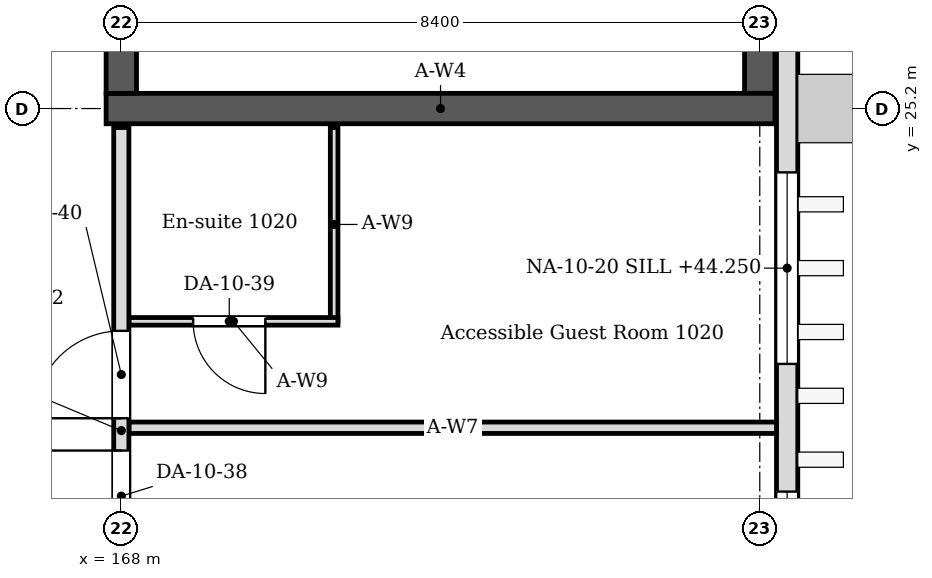
"""IFC4 building model, lengths in metres.
Left out: names, types, materials, properties, quantities, classifications, styles, units other than length and angle.
Written with IfcOpenShell. Run it as: python <this file> out.ifc"""

import sys

from ifc_helpers import new_model, si_unit, direction, frame, frame_2d, origin, place, context, subcontext, project, spatial, rectangle, extrude, element, fill, save


model = new_model("IFC4")
c1 = context("Model", 3, precision=1e-05, world=origin(), true_north=direction((0.0, 1.0)))
c2 = subcontext(c1, "Body", "Model", "MODEL_VIEW")
j1 = project(units=[si_unit("LENGTHUNIT", "METRE"), si_unit("PLANEANGLEUNIT", "RADIAN")], contexts=[c1])
p1 = place(None, origin())
s1 = spatial("IfcSite", under=j1, at=p1, CompositionType="ELEMENT")
p2 = place(p1, origin())
s2 = spatial("IfcBuilding", under=s1, at=p2, CompositionType="ELEMENT")
p3 = place(p2, frame((0.0, 0.0, 43.8)))
s3 = spatial("IfcBuildingStorey", under=s2, at=p3, CompositionType="ELEMENT", Elevation=43.8)
p4 = place(p3, frame((167.8, 25.2, 0.0), z_axis=(0.0, 0.0, 1.0), x_axis=(1.0, 0.0, 0.0)))
e1 = element("IfcWall", 1, at=p4, inside=s3, PredefinedType="SOLIDWALL", context=c2, shape_type="SweptSolid", body=[
    extrude(rectangle(XDim=8.8, YDim=0.4, at=frame_2d((4.4, 0.0))), origin(), (0.0, 0.0, 1.0), 4.05),
])
p5 = place(p3, frame((168.0, 25.4, 0.0), z_axis=(0.0, 0.0, 1.0), x_axis=(0.0, 1.0, 0.0)))
e2 = element("IfcWall", 2, at=p5, inside=s3, PredefinedType="SOLIDWALL", context=c2, shape_type="SweptSolid", body=[
    extrude(rectangle(XDim=16.4, YDim=0.4, at=frame_2d((8.2, 0.0))), origin(), (0.0, 0.0, 1.0), 4.05),
])
p6 = place(p5, frame((1.0, 0.0, 0.0)))
e3 = element("IfcOpeningElement", 3, at=p6, cuts=e2, PredefinedType="OPENING", context=c2, shape_type="SweptSolid", body=[
    extrude(rectangle(XDim=1.0, YDim=2.1, at=frame_2d((0.5, 1.05))), frame((0.0, 0.21, 0.0), z_axis=(0.0, -1.0, 0.0), x_axis=(1.0, 0.0, 0.0)), (0.0, 0.0, 1.0), 0.42),
])
p7 = place(p5, frame((14.4, 0.0, 0.0)))
e4 = element("IfcOpeningElement", 4, at=p7, cuts=e2, PredefinedType="OPENING", context=c2, shape_type="SweptSolid", body=[
    extrude(rectangle(XDim=1.4, YDim=2.1, at=frame_2d((0.7, 1.05))), frame((0.0, 0.21, 0.0), z_axis=(0.0, -1.0, 0.0), x_axis=(1.0, 0.0, 0.0)), (0.0, 0.0, 1.0), 0.42),
])
p8 = place(p3, frame((176.4, 25.4, 0.0), z_axis=(0.0, 0.0, 1.0), x_axis=(0.0, 1.0, 0.0)))
e5 = element("IfcWall", 5, at=p8, inside=s3, PredefinedType="SOLIDWALL", context=c2, shape_type="SweptSolid", body=[
    extrude(rectangle(XDim=16.4, YDim=0.4, at=frame_2d((8.2, 0.0))), origin(), (0.0, 0.0, 1.0), 4.05),
])
p9 = place(p3, frame((176.76, -0.22, 0.0), z_axis=(0.0, 0.0, 1.0), x_axis=(0.0, 1.0, 0.0)))
e6 = element("IfcWall", 6, at=p9, inside=s3, PredefinedType="SOLIDWALL", context=c2, shape_type="SweptSolid", body=[
    extrude(rectangle(XDim=42.57, YDim=0.28, at=frame_2d((21.285, 0.0))), origin(), (0.0, 0.0, 1.0), 4.05),
])
p10 = place(p9, frame((9.88, 0.0, 0.6)))
e7 = element("IfcOpeningElement", 7, at=p10, cuts=e6, PredefinedType="OPENING", context=c2, shape_type="SweptSolid", body=[
    extrude(rectangle(XDim=2.52, YDim=2.4, at=frame_2d((1.26, 1.2))), frame((0.0, 0.15, 0.0), z_axis=(0.0, -1.0, 0.0), x_axis=(1.0, 0.0, 0.0)), (0.0, 0.0, 1.0), 0.3),
])
p11 = place(p9, frame((14.08, 0.0, 0.6)))
e8 = element("IfcOpeningElement", 8, at=p11, cuts=e6, PredefinedType="OPENING", context=c2, shape_type="SweptSolid", body=[
    extrude(rectangle(XDim=2.52, YDim=2.4, at=frame_2d((1.26, 1.2))), frame((0.0, 0.15, 0.0), z_axis=(0.0, -1.0, 0.0), x_axis=(1.0, 0.0, 0.0)), (0.0, 0.0, 1.0), 0.3),
])
p12 = place(p9, frame((17.86, 0.0, 0.6)))
e9 = element("IfcOpeningElement", 9, at=p12, cuts=e6, PredefinedType="OPENING", context=c2, shape_type="SweptSolid", body=[
    extrude(rectangle(XDim=2.52, YDim=2.4, at=frame_2d((1.26, 1.2))), frame((0.0, 0.15, 0.0), z_axis=(0.0, -1.0, 0.0), x_axis=(1.0, 0.0, 0.0)), (0.0, 0.0, 1.0), 0.3),
])
p13 = place(p9, frame((22.06, 0.0, 0.45)))
e10 = element("IfcOpeningElement", 10, at=p13, cuts=e6, PredefinedType="OPENING", context=c2, shape_type="SweptSolid", body=[
    extrude(rectangle(XDim=2.52, YDim=2.1, at=frame_2d((1.26, 1.05))), frame((0.0, 0.15, 0.0), z_axis=(0.0, -1.0, 0.0), x_axis=(1.0, 0.0, 0.0)), (0.0, 0.0, 1.0), 0.3),
])
p14 = place(p3, frame((170.8, 22.4, 0.0), z_axis=(0.0, 0.0, 1.0), x_axis=(0.0, 1.0, 0.0)))
e11 = element("IfcWall", 11, at=p14, inside=s3, PredefinedType="PARTITIONING", context=c2, shape_type="SweptSolid", body=[
    extrude(rectangle(XDim=2.55, YDim=0.1, at=frame_2d((1.275, 0.0))), origin(), (0.0, 0.0, 1.0), 4.05),
])
p15 = place(p3, frame((170.85, 22.4, 0.0), z_axis=(0.0, 0.0, 1.0), x_axis=(-1.0, 0.0, 0.0)))
e12 = element("IfcWall", 12, at=p15, inside=s3, PredefinedType="PARTITIONING", context=c2, shape_type="SweptSolid", body=[
    extrude(rectangle(XDim=2.75, YDim=0.1, at=frame_2d((1.375, 0.0))), origin(), (0.0, 0.0, 1.0), 4.05),
])
p16 = place(p15, frame((0.955, 0.0, 0.0)))
e13 = element("IfcOpeningElement", 13, at=p16, cuts=e12, PredefinedType="OPENING", context=c2, shape_type="SweptSolid", body=[
    extrude(rectangle(XDim=0.95, YDim=2.1, at=frame_2d((0.475, 1.05))), frame((0.0, 0.06, 0.0), z_axis=(0.0, -1.0, 0.0), x_axis=(1.0, 0.0, 0.0)), (0.0, 0.0, 1.0), 0.12),
])
p17 = place(p3, frame((168.1, 21.0, 0.0), z_axis=(0.0, 0.0, 1.0), x_axis=(1.0, 0.0, 0.0)))
e14 = element("IfcWall", 14, at=p17, inside=s3, PredefinedType="PARTITIONING", context=c2, shape_type="SweptSolid", body=[
    extrude(rectangle(XDim=8.52, YDim=0.15, at=frame_2d((4.26, 0.0))), origin(), (0.0, 0.0, 1.0), 3.604),
])
p18 = place(p3, frame((168.0, 16.975, 0.0), z_axis=(0.0, 0.0, 1.0), x_axis=(0.0, 1.0, 0.0)))
e15 = element("IfcWall", 15, at=p18, inside=s3, PredefinedType="PARTITIONING", context=c2, shape_type="SweptSolid", body=[
    extrude(rectangle(XDim=7.975, YDim=0.2, at=frame_2d((3.987, 0.0))), origin(), (0.0, 0.0, 1.0), 3.45),
])
p19 = place(p18, frame((2.525, 0.0, 0.0)))
e16 = element("IfcOpeningElement", 16, at=p19, cuts=e15, PredefinedType="OPENING", context=c2, shape_type="SweptSolid", body=[
    extrude(rectangle(XDim=1.2, YDim=2.1, at=frame_2d((0.6, 1.05))), frame((0.0, 0.11, 0.0), z_axis=(0.0, -1.0, 0.0), x_axis=(1.0, 0.0, 0.0)), (0.0, 0.0, 1.0), 0.22),
])
p20 = place(p18, frame((4.15, 0.0, 0.0)))
e17 = element("IfcOpeningElement", 17, at=p20, cuts=e15, PredefinedType="OPENING", context=c2, shape_type="SweptSolid", body=[
    extrude(rectangle(XDim=1.15, YDim=2.1, at=frame_2d((0.575, 1.05))), frame((0.0, 0.11, 0.0), z_axis=(0.0, -1.0, 0.0), x_axis=(1.0, 0.0, 0.0)), (0.0, 0.0, 1.0), 0.22),
])
p21 = place(p12, origin())
e18 = element("IfcWindow", 18, at=p21, inside=s3, PartitioningType="SINGLE_PANEL", PredefinedType="WINDOW", context=c2, shape_type="SweptSolid", body=[
    extrude(rectangle(XDim=2.52, YDim=2.4, at=frame_2d((1.26, 1.2))), frame((0.0, 0.03, 0.0), z_axis=(0.0, -1.0, 0.0), x_axis=(1.0, 0.0, 0.0)), (0.0, 0.0, 1.0), 0.06),
])
fill(e9, e18)
p22 = place(p13, origin())
e19 = element("IfcWindow", 19, at=p22, inside=s3, PartitioningType="SINGLE_PANEL", PredefinedType="WINDOW", context=c2, shape_type="SweptSolid", body=[
    extrude(rectangle(XDim=2.52, YDim=2.1, at=frame_2d((1.26, 1.05))), frame((0.0, 0.03, 0.0), z_axis=(0.0, -1.0, 0.0), x_axis=(1.0, 0.0, 0.0)), (0.0, 0.0, 1.0), 0.06),
])
fill(e10, e19)
p23 = place(p19, origin())
e20 = element("IfcDoor", 20, at=p23, inside=s3, OperationType="SINGLE_SWING_RIGHT", PredefinedType="DOOR", context=c2, shape_type="SweptSolid", body=[
    extrude(rectangle(XDim=1.2, YDim=2.1, at=frame_2d((0.6, 1.05))), frame((0.0, 0.025, 0.0), z_axis=(0.0, -1.0, 0.0), x_axis=(1.0, 0.0, 0.0)), (0.0, 0.0, 1.0), 0.05),
])
fill(e16, e20)
p24 = place(p16, origin())
e21 = element("IfcDoor", 21, at=p24, inside=s3, OperationType="SINGLE_SWING_LEFT", PredefinedType="DOOR", context=c2, shape_type="SweptSolid", body=[
    extrude(rectangle(XDim=0.95, YDim=2.1, at=frame_2d((0.475, 1.05))), frame((0.0, 0.025, 0.0), z_axis=(0.0, -1.0, 0.0), x_axis=(1.0, 0.0, 0.0)), (0.0, 0.0, 1.0), 0.05),
])
fill(e13, e21)
p25 = place(p20, origin())
e22 = element("IfcDoor", 22, at=p25, inside=s3, OperationType="SINGLE_SWING_LEFT", PredefinedType="DOOR", context=c2, shape_type="SweptSolid", body=[
    extrude(rectangle(XDim=1.15, YDim=2.1, at=frame_2d((0.575, 1.05))), frame((0.0, 0.025, 0.0), z_axis=(0.0, -1.0, 0.0), x_axis=(1.0, 0.0, 0.0)), (0.0, 0.0, 1.0), 0.05),
])
fill(e17, e22)
save(model, sys.argv[1])
